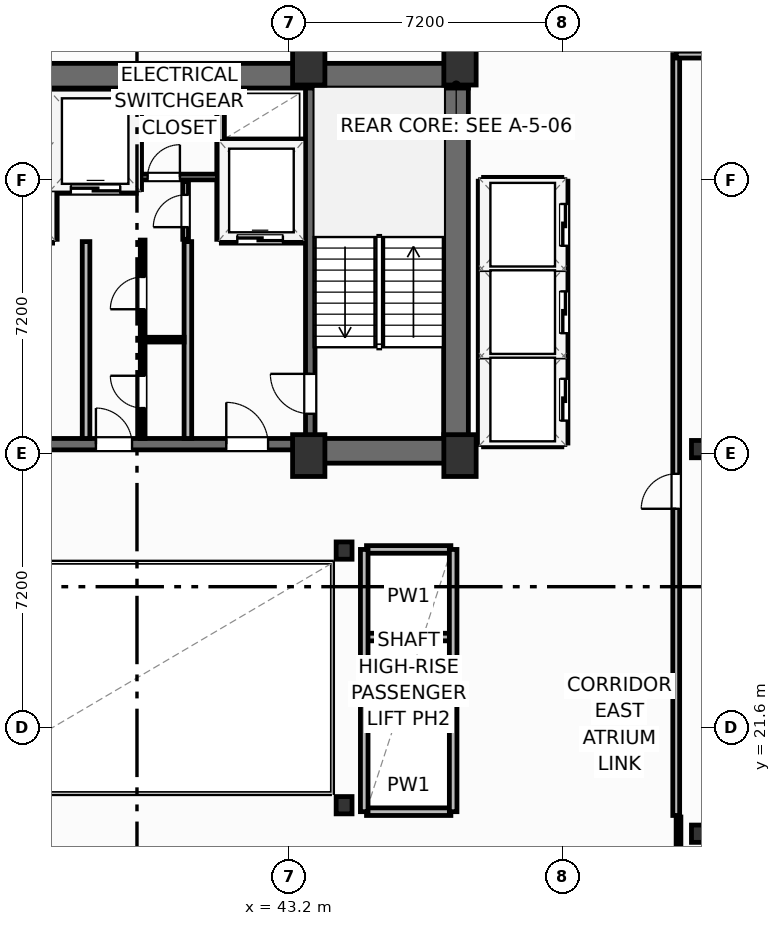
"""IFC4 building model, lengths in metres.
Left out: names, types, materials, properties, quantities, classifications, styles, units other than length and angle.
Written with IfcOpenShell. Run it as: python <this file> out.ifc"""

import sys

from ifc_helpers import new_model, si_unit, direction, frame, frame_2d, origin, origin_2d, place, context, subcontext, project, spatial, rectangle, i_section, extrude, element, fill, save


model = new_model("IFC4")
c1 = context("Model", 3, precision=1e-05, world=origin(), true_north=direction((0.0, 1.0)))
c2 = subcontext(c1, "Body", "Model", "MODEL_VIEW")
j1 = project(units=[si_unit("LENGTHUNIT", "METRE"), si_unit("PLANEANGLEUNIT", "RADIAN")], contexts=[c1])
p1 = place(None, origin())
s1 = spatial("IfcSite", under=j1, at=p1, CompositionType="ELEMENT")
p2 = place(p1, origin())
s2 = spatial("IfcBuilding", under=s1, at=p2, CompositionType="ELEMENT")
p3 = place(p2, frame((0.0, 0.0, 185.7)))
s3 = spatial("IfcBuildingStorey", under=s2, at=p3, CompositionType="ELEMENT", Elevation=185.7)
for number, where, z_axis, x_axis in (
    (1, (43.72, 28.75, 0.0), (0.0, 0.0, 1.0), (1.0, 0.0, 0.0)),
    (2, (47.7, 28.75, 0.0), (0.0, 0.0, 1.0), (1.0, 0.0, 0.0)),
    (3, (43.72, 39.05, 0.0), (0.0, 0.0, 1.0), (1.0, 0.0, 0.0)),
    (4, (47.7, 39.05, 0.0), (0.0, 0.0, 1.0), (1.0, 0.0, 0.0)),
):
    element("IfcColumn", number, at=place(p3, frame(where, z_axis=z_axis, x_axis=x_axis)), inside=s3, PredefinedType="COLUMN", context=c2, shape_type="SweptSolid", body=[
        extrude(rectangle(XDim=0.85, YDim=1.1, at=origin_2d()), origin(), (0.0, 0.0, 1.0), 3.7),
    ])
for number, where, z_axis, x_axis in (
    (5, (44.65, 19.55, 0.0), (0.0, 0.0, 1.0), (1.0, 0.0, 0.0)),
    (6, (44.65, 26.25, 0.0), (0.0, 0.0, 1.0), (1.0, 0.0, 0.0)),
    (7, (54.0, 18.8, 0.0), (0.0, 0.0, 1.0), (1.0, 0.0, 0.0)),
    (8, (54.0, 28.92, 0.0), (0.0, 0.0, 1.0), (1.0, 0.0, 0.0)),
):
    element("IfcColumn", number, at=place(p3, frame(where, z_axis=z_axis, x_axis=x_axis)), inside=s3, PredefinedType="COLUMN", context=c2, shape_type="SweptSolid", body=[
        extrude(i_section(OverallWidth=0.418, OverallDepth=0.455, WebThickness=0.042, FlangeThickness=0.068, FilletRadius=0.025, at=origin_2d()), origin(), (0.0, 0.0, 1.0), 3.7),
    ])
p4 = place(p3, frame((30.48, 38.745, 0.0), z_axis=(0.0, 0.0, 1.0), x_axis=(1.0, 0.0, 0.0)))
e9 = element("IfcWall", 9, at=p4, inside=s3, PredefinedType="SHEAR", context=c2, shape_type="SweptSolid", body=[
    extrude(rectangle(XDim=17.44, YDim=0.65, at=frame_2d((8.72, 0.0))), origin(), (0.0, 0.0, 1.0), 3.45),
])
p5 = place(p3, frame((47.595, 29.2, 0.0), z_axis=(0.0, 0.0, 1.0), x_axis=(0.0, 1.0, 0.0)))
e10 = element("IfcWall", 10, at=p5, inside=s3, PredefinedType="SHEAR", context=c2, shape_type="SweptSolid", body=[
    extrude(rectangle(XDim=9.22, YDim=0.65, at=frame_2d((4.61, 0.0))), origin(), (0.0, 0.0, 1.0), 3.45),
])
p6 = place(p3, frame((43.6, 28.875, 0.0), z_axis=(0.0, 0.0, 1.0), x_axis=(1.0, 0.0, 0.0)))
e11 = element("IfcWall", 11, at=p6, inside=s3, PredefinedType="SHEAR", context=c2, shape_type="SweptSolid", body=[
    extrude(rectangle(XDim=4.32, YDim=0.65, at=frame_2d((2.16, 0.0))), origin(), (0.0, 0.0, 1.0), 3.45),
])
p7 = place(p3, frame((34.8, 29.05, 0.0), z_axis=(0.0, 0.0, 1.0), x_axis=(1.0, 0.0, 0.0)))
e12 = element("IfcWall", 12, at=p7, inside=s3, PredefinedType="SHEAR", context=c2, shape_type="SweptSolid", body=[
    extrude(rectangle(XDim=8.8, YDim=0.3, at=frame_2d((4.4, 0.0))), origin(), (0.0, 0.0, 1.0), 3.45),
])
p8 = place(p7, frame((0.95, 0.0, 0.0)))
e13 = element("IfcOpeningElement", 13, at=p8, cuts=e12, PredefinedType="OPENING", context=c2, shape_type="SweptSolid", body=[
    extrude(rectangle(XDim=1.1, YDim=2.15, at=frame_2d((0.55, 1.075))), frame((0.0, 0.16, 0.0), z_axis=(0.0, -1.0, 0.0), x_axis=(1.0, 0.0, 0.0)), (0.0, 0.0, 1.0), 0.32),
])
p9 = place(p7, frame((6.75, 0.0, 0.0)))
e14 = element("IfcOpeningElement", 14, at=p9, cuts=e12, PredefinedType="OPENING", context=c2, shape_type="SweptSolid", body=[
    extrude(rectangle(XDim=1.1, YDim=2.15, at=frame_2d((0.55, 1.075))), frame((0.0, 0.16, 0.0), z_axis=(0.0, -1.0, 0.0), x_axis=(1.0, 0.0, 0.0)), (0.0, 0.0, 1.0), 0.32),
])
p10 = place(p7, frame((3.32, 0.0, 0.0)))
e15 = element("IfcOpeningElement", 15, at=p10, cuts=e12, PredefinedType="OPENING", context=c2, shape_type="SweptSolid", body=[
    extrude(rectangle(XDim=0.95, YDim=2.15, at=frame_2d((0.475, 1.075))), frame((0.0, 0.16, 0.0), z_axis=(0.0, -1.0, 0.0), x_axis=(1.0, 0.0, 0.0)), (0.0, 0.0, 1.0), 0.32),
])
p11 = place(p3, frame((43.76, 29.2, 0.0), z_axis=(0.0, 0.0, 1.0), x_axis=(0.0, 1.0, 0.0)))
e16 = element("IfcWall", 16, at=p11, inside=s3, PredefinedType="SHEAR", context=c2, shape_type="SweptSolid", body=[
    extrude(rectangle(XDim=9.22, YDim=0.25, at=frame_2d((4.61, 0.0))), origin(), (0.0, 0.0, 1.0), 3.45),
])
p12 = place(p11, frame((0.65, 0.0, 0.0)))
e17 = element("IfcOpeningElement", 17, at=p12, cuts=e16, PredefinedType="OPENING", context=c2, shape_type="SweptSolid", body=[
    extrude(rectangle(XDim=1.05, YDim=2.15, at=frame_2d((0.525, 1.075))), frame((0.0, 0.135, 0.0), z_axis=(0.0, -1.0, 0.0), x_axis=(1.0, 0.0, 0.0)), (0.0, 0.0, 1.0), 0.27),
])
p13 = place(p3, frame((53.45, 16.61, 0.0), z_axis=(0.0, 0.0, 1.0), x_axis=(0.0, 1.0, 0.0)))
e18 = element("IfcWall", 18, at=p13, inside=s3, PredefinedType="PARTITIONING", context=c2, shape_type="SweptSolid", body=[
    extrude(rectangle(XDim=2.63, YDim=0.125, at=frame_2d((1.315, 0.0))), origin(), (0.0, 0.0, 1.0), 2.662),
])
p14 = place(p3, frame((53.39, 19.28, 0.0), z_axis=(0.0, 0.0, 1.0), x_axis=(0.0, 1.0, 0.0)))
e19 = element("IfcWall", 19, at=p14, inside=s3, PredefinedType="PARTITIONING", context=c2, shape_type="SweptSolid", body=[
    extrude(rectangle(XDim=20.02, YDim=0.18, at=frame_2d((10.01, 0.0))), origin(), (0.0, 0.0, 1.0), 3.45),
])
p15 = place(p14, frame((8.07, 0.0, 0.0)))
e20 = element("IfcOpeningElement", 20, at=p15, cuts=e19, PredefinedType="OPENING", context=c2, shape_type="SweptSolid", body=[
    extrude(rectangle(XDim=0.92, YDim=2.05, at=frame_2d((0.46, 1.025))), frame((0.0, 0.1, 0.0), z_axis=(0.0, -1.0, 0.0), x_axis=(1.0, 0.0, 0.0)), (0.0, 0.0, 1.0), 0.2),
])
p16 = place(p3, frame((53.39, 39.3, 0.0), z_axis=(0.0, 0.0, 1.0), x_axis=(1.0, 0.0, 0.0)))
e21 = element("IfcWall", 21, at=p16, inside=s3, PredefinedType="PARTITIONING", context=c2, shape_type="SweptSolid", body=[
    extrude(rectangle(XDim=19.49, YDim=0.18, at=frame_2d((9.745, 0.0))), origin(), (0.0, 0.0, 1.0), 3.45),
])
for number, where, z_axis, x_axis in (
    (22, (37.86, 29.2, 0.0), (0.0, 0.0, 1.0), (0.0, 1.0, 0.0)),
    (23, (40.54, 29.2, 0.0), (0.0, 0.0, 1.0), (0.0, 1.0, 0.0)),
):
    element("IfcWall", number, at=place(p3, frame(where, z_axis=z_axis, x_axis=x_axis)), inside=s3, PredefinedType="PARTITIONING", context=c2, shape_type="SweptSolid", body=[
        extrude(rectangle(XDim=5.18, YDim=0.2, at=frame_2d((2.59, 0.0))), origin(), (0.0, 0.0, 1.0), 3.45),
    ])
p17 = place(p3, frame((37.0, 34.44, 0.0), z_axis=(0.0, 0.0, 1.0), x_axis=(0.0, 1.0, 0.0)))
e24 = element("IfcWall", 24, at=p17, inside=s3, PredefinedType="PARTITIONING", context=c2, shape_type="SweptSolid", body=[
    extrude(rectangle(XDim=3.9, YDim=0.2, at=frame_2d((1.95, 0.0))), origin(), (0.0, 0.0, 1.0), 3.45),
])
p18 = place(p3, frame((41.42, 34.44, 0.0), z_axis=(0.0, 0.0, 1.0), x_axis=(1.0, 0.0, 0.0)))
e25 = element("IfcWall", 25, at=p18, inside=s3, PredefinedType="PARTITIONING", context=c2, shape_type="SweptSolid", body=[
    extrude(rectangle(XDim=2.18, YDim=0.2, at=frame_2d((1.09, 0.0))), origin(), (0.0, 0.0, 1.0), 3.45),
])
p19 = place(p18, frame((0.42, 0.0, 0.0)))
e26 = element("IfcOpeningElement", 26, at=p19, cuts=e25, PredefinedType="OPENING", context=c2, shape_type="SweptSolid", body=[
    extrude(rectangle(XDim=1.2, YDim=2.2, at=frame_2d((0.6, 1.1))), frame((0.0, 0.11, 0.0), z_axis=(0.0, -1.0, 0.0), x_axis=(1.0, 0.0, 0.0)), (0.0, 0.0, 1.0), 0.22),
])
p20 = place(p3, frame((41.42, 36.98, 0.0), z_axis=(0.0, 0.0, 1.0), x_axis=(1.0, 0.0, 0.0)))
e27 = element("IfcWall", 27, at=p20, inside=s3, PredefinedType="PARTITIONING", context=c2, shape_type="SweptSolid", body=[
    extrude(rectangle(XDim=2.18, YDim=0.2, at=frame_2d((1.09, 0.0))), origin(), (0.0, 0.0, 1.0), 3.45),
])
p21 = place(p3, frame((41.4, 34.44, 0.0), z_axis=(0.0, 0.0, 1.0), x_axis=(0.0, 1.0, 0.0)))
e28 = element("IfcWall", 28, at=p21, inside=s3, PredefinedType="PARTITIONING", context=c2, shape_type="SweptSolid", body=[
    extrude(rectangle(XDim=3.9, YDim=0.2, at=frame_2d((1.95, 0.0))), origin(), (0.0, 0.0, 1.0), 3.45),
])
p22 = place(p3, frame((37.06, 35.75, 0.0), z_axis=(0.0, 0.0, 1.0), x_axis=(1.0, 0.0, 0.0)))
e29 = element("IfcWall", 29, at=p22, inside=s3, PredefinedType="PARTITIONING", context=c2, shape_type="SweptSolid", body=[
    extrude(rectangle(XDim=2.12, YDim=0.2, at=frame_2d((1.06, 0.0))), origin(), (0.0, 0.0, 1.0), 3.45),
])
p23 = place(p22, frame((0.4, 0.0, 0.0)))
e30 = element("IfcOpeningElement", 30, at=p23, cuts=e29, PredefinedType="OPENING", context=c2, shape_type="SweptSolid", body=[
    extrude(rectangle(XDim=1.3, YDim=2.2, at=frame_2d((0.65, 1.1))), frame((0.0, 0.11, 0.0), z_axis=(0.0, -1.0, 0.0), x_axis=(1.0, 0.0, 0.0)), (0.0, 0.0, 1.0), 0.22),
])
p24 = place(p3, frame((39.22, 35.75, 0.0), z_axis=(0.0, 0.0, 1.0), x_axis=(0.0, 1.0, 0.0)))
e31 = element("IfcWall", 31, at=p24, inside=s3, PredefinedType="PARTITIONING", context=c2, shape_type="SweptSolid", body=[
    extrude(rectangle(XDim=2.59, YDim=0.2, at=frame_2d((1.295, 0.0))), origin(), (0.0, 0.0, 1.0), 3.45),
])
p25 = place(p3, frame((39.3, 36.08, 0.0), z_axis=(0.0, 0.0, 1.0), x_axis=(1.0, 0.0, 0.0)))
e32 = element("IfcWall", 32, at=p25, inside=s3, PredefinedType="PARTITIONING", context=c2, shape_type="SweptSolid", body=[
    extrude(rectangle(XDim=2.02, YDim=0.15, at=frame_2d((1.01, 0.0))), origin(), (0.0, 0.0, 1.0), 3.45),
])
p26 = place(p25, frame((0.18, 0.0, 0.0)))
e33 = element("IfcOpeningElement", 33, at=p26, cuts=e32, PredefinedType="OPENING", context=c2, shape_type="SweptSolid", body=[
    extrude(rectangle(XDim=0.85, YDim=2.05, at=frame_2d((0.425, 1.025))), frame((0.0, 0.085, 0.0), z_axis=(0.0, -1.0, 0.0), x_axis=(1.0, 0.0, 0.0)), (0.0, 0.0, 1.0), 0.17),
])
p27 = place(p3, frame((40.48, 34.44, 0.0), z_axis=(0.0, 0.0, 1.0), x_axis=(0.0, 1.0, 0.0)))
e34 = element("IfcWall", 34, at=p27, inside=s3, PredefinedType="PARTITIONING", context=c2, shape_type="SweptSolid", body=[
    extrude(rectangle(XDim=1.52, YDim=0.15, at=frame_2d((0.76, 0.0))), origin(), (0.0, 0.0, 1.0), 3.45),
])
p28 = place(p27, frame((0.32, 0.0, 0.0)))
e35 = element("IfcOpeningElement", 35, at=p28, cuts=e34, PredefinedType="OPENING", context=c2, shape_type="SweptSolid", body=[
    extrude(rectangle(XDim=0.85, YDim=2.05, at=frame_2d((0.425, 1.025))), frame((0.0, 0.085, 0.0), z_axis=(0.0, -1.0, 0.0), x_axis=(1.0, 0.0, 0.0)), (0.0, 0.0, 1.0), 0.17),
])
p29 = place(p3, frame((39.35, 31.8, 0.0), z_axis=(0.0, 0.0, 1.0), x_axis=(1.0, 0.0, 0.0)))
e36 = element("IfcWall", 36, at=p29, inside=s3, PredefinedType="PARTITIONING", context=c2, shape_type="SweptSolid", body=[
    extrude(rectangle(XDim=1.09, YDim=0.125, at=frame_2d((0.545, 0.0))), origin(), (0.0, 0.0, 1.0), 3.45),
])
p30 = place(p3, frame((39.35, 29.2, 0.0), z_axis=(0.0, 0.0, 1.0), x_axis=(0.0, 1.0, 0.0)))
e37 = element("IfcWall", 37, at=p30, inside=s3, PredefinedType="PARTITIONING", context=c2, shape_type="SweptSolid", body=[
    extrude(rectangle(XDim=5.22, YDim=0.125, at=frame_2d((2.61, 0.0))), origin(), (0.0, 0.0, 1.0), 3.45),
])
p31 = place(p30, frame((0.8, 0.0, 0.0)))
e38 = element("IfcOpeningElement", 38, at=p31, cuts=e37, PredefinedType="OPENING", context=c2, shape_type="SweptSolid", body=[
    extrude(rectangle(XDim=0.85, YDim=2.05, at=frame_2d((0.425, 1.025))), frame((0.0, 0.073, 0.0), z_axis=(0.0, -1.0, 0.0), x_axis=(1.0, 0.0, 0.0)), (0.0, 0.0, 1.0), 0.145),
])
p32 = place(p30, frame((3.4, 0.0, 0.0)))
e39 = element("IfcOpeningElement", 39, at=p32, cuts=e37, PredefinedType="OPENING", context=c2, shape_type="SweptSolid", body=[
    extrude(rectangle(XDim=0.85, YDim=2.05, at=frame_2d((0.425, 1.025))), frame((0.0, 0.073, 0.0), z_axis=(0.0, -1.0, 0.0), x_axis=(1.0, 0.0, 0.0)), (0.0, 0.0, 1.0), 0.145),
])
for number, where, z_axis, x_axis in (
    (40, (48.32, 31.375, 0.0), (0.0, 0.0, 1.0), (1.0, 0.0, 0.0)),
    (41, (48.32, 33.675, 0.0), (0.0, 0.0, 1.0), (1.0, 0.0, 0.0)),
):
    element("IfcWall", number, at=place(p3, frame(where, z_axis=z_axis, x_axis=x_axis)), inside=s3, PredefinedType="PARTITIONING", context=c2, shape_type="SweptSolid", body=[
        extrude(rectangle(XDim=2.06, YDim=0.2, at=frame_2d((1.03, 0.0))), origin(), (0.0, 0.0, 1.0), 3.45),
    ])
p33 = place(p3, frame((48.32, 29.08, 0.0), z_axis=(0.0, 0.0, 1.0), x_axis=(1.0, 0.0, 0.0)))
e42 = element("IfcWall", 42, at=p33, inside=s3, PredefinedType="PARTITIONING", context=c2, shape_type="SweptSolid", body=[
    extrude(rectangle(XDim=2.06, YDim=0.2, at=frame_2d((1.03, 0.0))), origin(), (0.0, 0.0, 1.0), 2.662),
])
p34 = place(p3, frame((48.32, 35.97, 0.0), z_axis=(0.0, 0.0, 1.0), x_axis=(1.0, 0.0, 0.0)))
e43 = element("IfcWall", 43, at=p34, inside=s3, PredefinedType="PARTITIONING", context=c2, shape_type="SweptSolid", body=[
    extrude(rectangle(XDim=2.06, YDim=0.2, at=frame_2d((1.03, 0.0))), origin(), (0.0, 0.0, 1.0), 3.45),
])
p35 = place(p3, frame((48.28, 29.08, 0.0), z_axis=(0.0, 0.0, 1.0), x_axis=(0.0, 1.0, 0.0)))
e44 = element("IfcWall", 44, at=p35, inside=s3, PredefinedType="PARTITIONING", context=c2, shape_type="SweptSolid", body=[
    extrude(rectangle(XDim=6.89, YDim=0.2, at=frame_2d((3.445, 0.0))), origin(), (0.0, 0.0, 1.0), 3.45),
])
p36 = place(p3, frame((50.44, 29.08, 0.0), z_axis=(0.0, 0.0, 1.0), x_axis=(0.0, 1.0, 0.0)))
e45 = element("IfcWall", 45, at=p36, inside=s3, PredefinedType="PARTITIONING", context=c2, shape_type="SweptSolid", body=[
    extrude(rectangle(XDim=6.89, YDim=0.2, at=frame_2d((3.445, 0.0))), origin(), (0.0, 0.0, 1.0), 3.45),
])
p37 = place(p36, frame((0.59, 0.0, 0.0)))
e46 = element("IfcOpeningElement", 46, at=p37, cuts=e45, PredefinedType="OPENING", context=c2, shape_type="SweptSolid", body=[
    extrude(rectangle(XDim=1.1, YDim=2.15, at=frame_2d((0.55, 1.075))), frame((0.0, 0.11, 0.0), z_axis=(0.0, -1.0, 0.0), x_axis=(1.0, 0.0, 0.0)), (0.0, 0.0, 1.0), 0.22),
])
p38 = place(p36, frame((2.89, 0.0, 0.0)))
e47 = element("IfcOpeningElement", 47, at=p38, cuts=e45, PredefinedType="OPENING", context=c2, shape_type="SweptSolid", body=[
    extrude(rectangle(XDim=1.1, YDim=2.15, at=frame_2d((0.55, 1.075))), frame((0.0, 0.11, 0.0), z_axis=(0.0, -1.0, 0.0), x_axis=(1.0, 0.0, 0.0)), (0.0, 0.0, 1.0), 0.22),
])
p39 = place(p36, frame((5.19, 0.0, 0.0)))
e48 = element("IfcOpeningElement", 48, at=p39, cuts=e45, PredefinedType="OPENING", context=c2, shape_type="SweptSolid", body=[
    extrude(rectangle(XDim=1.1, YDim=2.15, at=frame_2d((0.55, 1.075))), frame((0.0, 0.11, 0.0), z_axis=(0.0, -1.0, 0.0), x_axis=(1.0, 0.0, 0.0)), (0.0, 0.0, 1.0), 0.22),
])
for number, where, z_axis, x_axis in (
    (49, (45.24, 21.675, 0.0), (0.0, 0.0, 1.0), (1.0, 0.0, 0.0)),
    (50, (45.24, 23.975, 0.0), (0.0, 0.0, 1.0), (1.0, 0.0, 0.0)),
):
    element("IfcWall", number, at=place(p3, frame(where, z_axis=z_axis, x_axis=x_axis)), inside=s3, PredefinedType="PARTITIONING", context=c2, shape_type="SweptSolid", body=[
        extrude(rectangle(XDim=2.22, YDim=0.2, at=frame_2d((1.11, 0.0))), origin(), (0.0, 0.0, 1.0), 3.45),
    ])
p40 = place(p3, frame((45.24, 19.38, 0.0), z_axis=(0.0, 0.0, 1.0), x_axis=(1.0, 0.0, 0.0)))
e51 = element("IfcWall", 51, at=p40, inside=s3, PredefinedType="PARTITIONING", context=c2, shape_type="SweptSolid", body=[
    extrude(rectangle(XDim=2.22, YDim=0.2, at=frame_2d((1.11, 0.0))), origin(), (0.0, 0.0, 1.0), 2.662),
])
p41 = place(p3, frame((45.24, 26.28, 0.0), z_axis=(0.0, 0.0, 1.0), x_axis=(1.0, 0.0, 0.0)))
e52 = element("IfcWall", 52, at=p41, inside=s3, PredefinedType="PARTITIONING", context=c2, shape_type="SweptSolid", body=[
    extrude(rectangle(XDim=2.22, YDim=0.2, at=frame_2d((1.11, 0.0))), origin(), (0.0, 0.0, 1.0), 3.45),
])
for number, where, z_axis, x_axis in (
    (53, (45.18, 19.38, 0.0), (0.0, 0.0, 1.0), (0.0, 1.0, 0.0)),
    (54, (47.52, 19.38, 0.0), (0.0, 0.0, 1.0), (0.0, 1.0, 0.0)),
):
    element("IfcWall", number, at=place(p3, frame(where, z_axis=z_axis, x_axis=x_axis)), inside=s3, PredefinedType="PARTITIONING", context=c2, shape_type="SweptSolid", body=[
        extrude(rectangle(XDim=6.9, YDim=0.2, at=frame_2d((3.45, 0.0))), origin(), (0.0, 0.0, 1.0), 3.45),
    ])
p42 = place(p15, origin())
e55 = element("IfcDoor", 55, at=p42, inside=s3, OperationType="SINGLE_SWING_LEFT", PredefinedType="DOOR", context=c2, shape_type="SweptSolid", body=[
    extrude(rectangle(XDim=0.92, YDim=2.05, at=frame_2d((0.46, 1.025))), frame((0.0, 0.025, 0.0), z_axis=(0.0, -1.0, 0.0), x_axis=(1.0, 0.0, 0.0)), (0.0, 0.0, 1.0), 0.05),
])
fill(e20, e55)
p43 = place(p12, origin())
e56 = element("IfcDoor", 56, at=p43, inside=s3, OperationType="SINGLE_SWING_RIGHT", PredefinedType="DOOR", context=c2, shape_type="SweptSolid", body=[
    extrude(rectangle(XDim=1.05, YDim=2.15, at=frame_2d((0.525, 1.075))), frame((0.0, 0.025, 0.0), z_axis=(0.0, -1.0, 0.0), x_axis=(1.0, 0.0, 0.0)), (0.0, 0.0, 1.0), 0.05),
])
fill(e17, e56)
p44 = place(p9, origin())
e57 = element("IfcDoor", 57, at=p44, inside=s3, OperationType="SINGLE_SWING_LEFT", PredefinedType="DOOR", context=c2, shape_type="SweptSolid", body=[
    extrude(rectangle(XDim=1.1, YDim=2.15, at=frame_2d((0.55, 1.075))), frame((0.0, 0.025, 0.0), z_axis=(0.0, -1.0, 0.0), x_axis=(1.0, 0.0, 0.0)), (0.0, 0.0, 1.0), 0.05),
])
fill(e14, e57)
p45 = place(p19, origin())
e58 = element("IfcDoor", 58, at=p45, inside=s3, OperationType="SLIDING_TO_LEFT", PredefinedType="DOOR", context=c2, shape_type="SweptSolid", body=[
    extrude(rectangle(XDim=1.2, YDim=2.2, at=frame_2d((0.6, 1.1))), frame((0.0, 0.025, 0.0), z_axis=(0.0, -1.0, 0.0), x_axis=(1.0, 0.0, 0.0)), (0.0, 0.0, 1.0), 0.05),
])
fill(e26, e58)
p46 = place(p23, origin())
e59 = element("IfcDoor", 59, at=p46, inside=s3, OperationType="SLIDING_TO_LEFT", PredefinedType="DOOR", context=c2, shape_type="SweptSolid", body=[
    extrude(rectangle(XDim=1.3, YDim=2.2, at=frame_2d((0.65, 1.1))), frame((0.0, 0.025, 0.0), z_axis=(0.0, -1.0, 0.0), x_axis=(1.0, 0.0, 0.0)), (0.0, 0.0, 1.0), 0.05),
])
fill(e30, e59)
p47 = place(p26, origin())
e60 = element("IfcDoor", 60, at=p47, inside=s3, OperationType="SINGLE_SWING_RIGHT", PredefinedType="DOOR", context=c2, shape_type="SweptSolid", body=[
    extrude(rectangle(XDim=0.85, YDim=2.05, at=frame_2d((0.425, 1.025))), frame((0.0, 0.025, 0.0), z_axis=(0.0, -1.0, 0.0), x_axis=(1.0, 0.0, 0.0)), (0.0, 0.0, 1.0), 0.05),
])
fill(e33, e60)
p48 = place(p28, origin())
e61 = element("IfcDoor", 61, at=p48, inside=s3, OperationType="SINGLE_SWING_LEFT", PredefinedType="DOOR", context=c2, shape_type="SweptSolid", body=[
    extrude(rectangle(XDim=0.85, YDim=2.05, at=frame_2d((0.425, 1.025))), frame((0.0, 0.025, 0.0), z_axis=(0.0, -1.0, 0.0), x_axis=(1.0, 0.0, 0.0)), (0.0, 0.0, 1.0), 0.05),
])
fill(e35, e61)
p49 = place(p31, origin())
e62 = element("IfcDoor", 62, at=p49, inside=s3, OperationType="SINGLE_SWING_RIGHT", PredefinedType="DOOR", context=c2, shape_type="SweptSolid", body=[
    extrude(rectangle(XDim=0.85, YDim=2.05, at=frame_2d((0.425, 1.025))), frame((0.0, 0.025, 0.0), z_axis=(0.0, -1.0, 0.0), x_axis=(1.0, 0.0, 0.0)), (0.0, 0.0, 1.0), 0.05),
])
fill(e38, e62)
p50 = place(p32, origin())
e63 = element("IfcDoor", 63, at=p50, inside=s3, OperationType="SINGLE_SWING_LEFT", PredefinedType="DOOR", context=c2, shape_type="SweptSolid", body=[
    extrude(rectangle(XDim=0.85, YDim=2.05, at=frame_2d((0.425, 1.025))), frame((0.0, 0.025, 0.0), z_axis=(0.0, -1.0, 0.0), x_axis=(1.0, 0.0, 0.0)), (0.0, 0.0, 1.0), 0.05),
])
fill(e39, e63)
p51 = place(p10, origin())
e64 = element("IfcDoor", 64, at=p51, inside=s3, OperationType="SINGLE_SWING_LEFT", PredefinedType="DOOR", context=c2, shape_type="SweptSolid", body=[
    extrude(rectangle(XDim=0.95, YDim=2.15, at=frame_2d((0.475, 1.075))), frame((0.0, 0.025, 0.0), z_axis=(0.0, -1.0, 0.0), x_axis=(1.0, 0.0, 0.0)), (0.0, 0.0, 1.0), 0.05),
])
fill(e15, e64)
p52 = place(p37, origin())
e65 = element("IfcDoor", 65, at=p52, inside=s3, OperationType="SLIDING_TO_LEFT", PredefinedType="DOOR", context=c2, shape_type="SweptSolid", body=[
    extrude(rectangle(XDim=1.1, YDim=2.15, at=frame_2d((0.55, 1.075))), frame((0.0, 0.025, 0.0), z_axis=(0.0, -1.0, 0.0), x_axis=(1.0, 0.0, 0.0)), (0.0, 0.0, 1.0), 0.05),
])
fill(e46, e65)
p53 = place(p38, origin())
e66 = element("IfcDoor", 66, at=p53, inside=s3, OperationType="SLIDING_TO_LEFT", PredefinedType="DOOR", context=c2, shape_type="SweptSolid", body=[
    extrude(rectangle(XDim=1.1, YDim=2.15, at=frame_2d((0.55, 1.075))), frame((0.0, 0.025, 0.0), z_axis=(0.0, -1.0, 0.0), x_axis=(1.0, 0.0, 0.0)), (0.0, 0.0, 1.0), 0.05),
])
fill(e47, e66)
p54 = place(p39, origin())
e67 = element("IfcDoor", 67, at=p54, inside=s3, OperationType="SLIDING_TO_LEFT", PredefinedType="DOOR", context=c2, shape_type="SweptSolid", body=[
    extrude(rectangle(XDim=1.1, YDim=2.15, at=frame_2d((0.55, 1.075))), frame((0.0, 0.025, 0.0), z_axis=(0.0, -1.0, 0.0), x_axis=(1.0, 0.0, 0.0)), (0.0, 0.0, 1.0), 0.05),
])
fill(e48, e67)
save(model, sys.argv[1])
